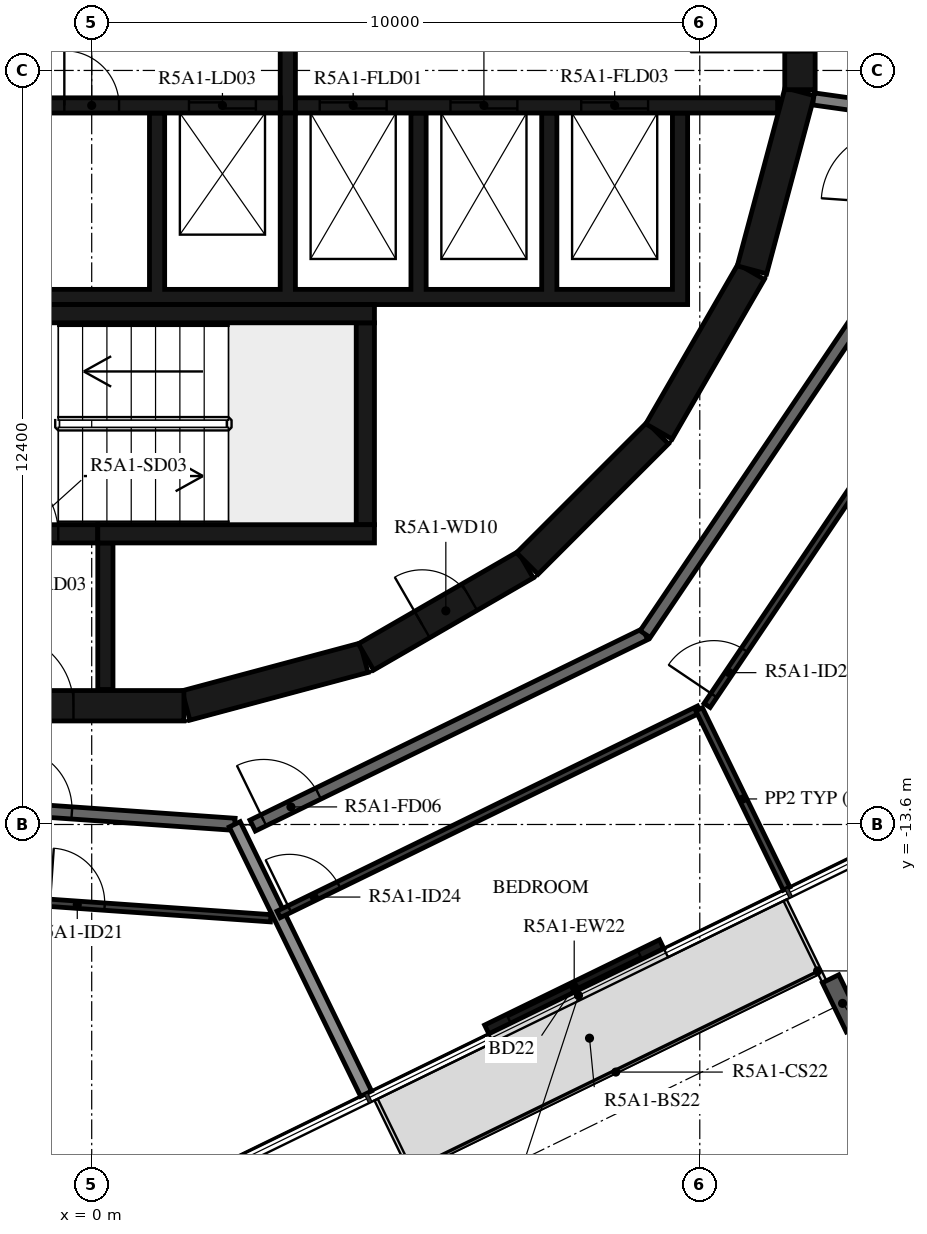
"""IFC4 building model, lengths in metres.
Left out: names, types, materials, properties, quantities, classifications, styles, units other than length and angle.
Written with IfcOpenShell. Run it as: python <this file> out.ifc"""

import sys

from ifc_helpers import new_model, si_unit, direction, frame, frame_2d, origin, origin_2d, place, context, subcontext, project, spatial, polyline, rectangle, i_section, outline, extrude, element, fill, save


model = new_model("IFC4")
c1 = context("Model", 3, precision=1e-05, world=origin(), true_north=direction((0.0, 1.0)))
c2 = subcontext(c1, "Body", "Model", "MODEL_VIEW")
j1 = project(units=[si_unit("LENGTHUNIT", "METRE"), si_unit("PLANEANGLEUNIT", "RADIAN")], contexts=[c1])
p1 = place(None, origin())
s1 = spatial("IfcSite", under=j1, at=p1, CompositionType="ELEMENT")
p2 = place(p1, origin())
s2 = spatial("IfcBuilding", under=s1, at=p2, CompositionType="ELEMENT")
p3 = place(p2, frame((0.0, 0.0, 191.9)))
s3 = spatial("IfcBuildingStorey", under=s2, at=p3, CompositionType="ELEMENT", Elevation=191.9)
p4 = place(p3, frame((12.348, -16.542, -0.38), z_axis=(0.0, 0.0, 1.0), x_axis=(-0.898794095235, -0.438371046456, 0.0)))
e1 = element("IfcColumn", 1, at=p4, inside=s3, PredefinedType="COLUMN", context=c2, shape_type="SweptSolid", body=[
    extrude(i_section(OverallWidth=0.3, OverallDepth=0.9, WebThickness=0.019, FlangeThickness=0.035, FilletRadius=0.03, at=origin_2d()), origin(), (0.0, 0.0, 1.0), 3.5),
])
p5 = place(p3, frame((6.497, -16.97, 0.0), z_axis=(0.0, 0.0, 1.0), x_axis=(0.898778711213, 0.43840258698, 0.0)))
e2 = element("IfcWall", 2, at=p5, inside=s3, PredefinedType="STANDARD", context=c2, shape_type="SweptSolid", body=[
    extrude(rectangle(XDim=3.2, YDim=0.16, at=frame_2d((1.6, 0.0))), origin(), (0.0, 0.0, 1.0), 3.12),
])
p6 = place(p5, frame((0.4, 0.0, 0.0)))
e3 = element("IfcOpeningElement", 3, at=p6, cuts=e2, PredefinedType="OPENING", context=c2, shape_type="SweptSolid", body=[
    extrude(rectangle(XDim=2.4, YDim=2.4, at=frame_2d((1.2, 1.2))), frame((0.0, 0.09, 0.0), z_axis=(0.0, -1.0, 0.0), x_axis=(1.0, 0.0, 0.0)), (0.0, 0.0, 1.0), 0.18),
])
p7 = place(p3, frame((1.55, -11.643, 0.0), z_axis=(0.0, 0.0, 1.0), x_axis=(0.965948410781, 0.258734743916, 0.0)))
e4 = element("IfcWall", 4, at=p7, inside=s3, PredefinedType="SHEAR", context=c2, shape_type="SweptSolid", body=[
    extrude(rectangle(XDim=3.033, YDim=0.5, at=frame_2d((1.516, 0.0))), origin(), (0.0, 0.0, 1.0), 3.12),
])
p8 = place(p3, frame((4.51, -10.845, 0.0), z_axis=(0.0, 0.0, 1.0), x_axis=(0.865975092491, 0.500087131594, 0.0)))
e5 = element("IfcWall", 5, at=p8, inside=s3, PredefinedType="SHEAR", context=c2, shape_type="SweptSolid", body=[
    extrude(rectangle(XDim=3.033, YDim=0.5, at=frame_2d((1.516, 0.0))), origin(), (0.0, 0.0, 1.0), 3.12),
])
p9 = place(p8, frame((1.066, 0.0, 0.0)))
e6 = element("IfcOpeningElement", 6, at=p9, cuts=e5, PredefinedType="OPENING", context=c2, shape_type="SweptSolid", body=[
    extrude(rectangle(XDim=0.9, YDim=2.1, at=frame_2d((0.45, 1.05))), frame((0.0, 0.26, 0.0), z_axis=(0.0, -1.0, 0.0), x_axis=(1.0, 0.0, 0.0)), (0.0, 0.0, 1.0), 0.52),
])
p10 = place(p3, frame((7.164, -9.308, 0.0), z_axis=(0.0, 0.0, 1.0), x_axis=(0.707106781187, 0.707106781187, 0.0)))
e7 = element("IfcWall", 7, at=p10, inside=s3, PredefinedType="SHEAR", context=c2, shape_type="SweptSolid", body=[
    extrude(rectangle(XDim=3.032, YDim=0.5, at=frame_2d((1.516, 0.0))), origin(), (0.0, 0.0, 1.0), 3.12),
])
for number, where, z_axis, x_axis in (
    (8, (9.329, -7.137, 0.0), (0.0, 0.0, 1.0), (0.5, 0.866, 0.0)),
    (9, (10.858, -4.479, 0.0), (0.0, 0.0, 1.0), (0.259, 0.966, 0.0)),
):
    element("IfcWall", number, at=place(p3, frame(where, z_axis=z_axis, x_axis=x_axis)), inside=s3, PredefinedType="SHEAR", context=c2, shape_type="SweptSolid", body=[
        extrude(rectangle(XDim=3.033, YDim=0.5, at=frame_2d((1.516, 0.0))), origin(), (0.0, 0.0, 1.0), 3.12),
    ])
p11 = place(p3, frame((11.647, -1.516, 0.0), z_axis=(0.0, 0.0, 1.0), x_axis=(0.0, 1.0, 0.0)))
e10 = element("IfcWall", 10, at=p11, inside=s3, PredefinedType="SHEAR", context=c2, shape_type="SweptSolid", body=[
    extrude(rectangle(XDim=3.033, YDim=0.5, at=frame_2d((1.516, 0.0))), origin(), (0.0, 0.0, 1.0), 3.12),
])
p12 = place(p11, frame((0.616, 0.0, 0.0)))
e11 = element("IfcOpeningElement", 11, at=p12, cuts=e10, PredefinedType="OPENING", context=c2, shape_type="SweptSolid", body=[
    extrude(rectangle(XDim=1.8, YDim=2.1, at=frame_2d((0.9, 1.05))), frame((0.0, 0.26, 0.0), z_axis=(0.0, -1.0, 0.0), x_axis=(1.0, 0.0, 0.0)), (0.0, 0.0, 1.0), 0.52),
])
p13 = place(p3, frame((-1.516, -11.647, 0.0), z_axis=(0.0, 0.0, 1.0), x_axis=(1.0, 0.0, 0.0)))
e12 = element("IfcWall", 12, at=p13, inside=s3, PredefinedType="SHEAR", context=c2, shape_type="SweptSolid", body=[
    extrude(rectangle(XDim=3.033, YDim=0.5, at=frame_2d((1.516, 0.0))), origin(), (0.0, 0.0, 1.0), 3.12),
])
p14 = place(p13, frame((0.016, 0.0, 0.0)))
e13 = element("IfcOpeningElement", 13, at=p14, cuts=e12, PredefinedType="OPENING", context=c2, shape_type="SweptSolid", body=[
    extrude(rectangle(XDim=1.2, YDim=2.1, at=frame_2d((0.6, 1.05))), frame((0.0, 0.26, 0.0), z_axis=(0.0, -1.0, 0.0), x_axis=(1.0, 0.0, 0.0)), (0.0, 0.0, 1.0), 0.52),
])
p15 = place(p3, frame((-2.4, -5.2, 0.0), z_axis=(0.0, 0.0, 1.0), x_axis=(1.0, 0.0, 0.0)))
e14 = element("IfcWall", 14, at=p15, inside=s3, PredefinedType="SHEAR", context=c2, shape_type="SweptSolid", body=[
    extrude(rectangle(XDim=7.05, YDim=0.3, at=frame_2d((3.525, 0.0))), origin(), (0.0, 0.0, 1.0), 3.12),
])
p16 = place(p3, frame((4.5, -8.67, 0.0), z_axis=(0.0, 0.0, 1.0), x_axis=(0.0, 1.0, 0.0)))
e15 = element("IfcWall", 15, at=p16, inside=s3, PredefinedType="SHEAR", context=c2, shape_type="SweptSolid", body=[
    extrude(rectangle(XDim=3.32, YDim=0.3, at=frame_2d((1.66, 0.0))), origin(), (0.0, 0.0, 1.0), 3.12),
])
p17 = place(p3, frame((0.1, -8.82, 0.0), z_axis=(0.0, 0.0, 1.0), x_axis=(1.0, 0.0, 0.0)))
e16 = element("IfcWall", 16, at=p17, inside=s3, PredefinedType="SHEAR", context=c2, shape_type="SweptSolid", body=[
    extrude(rectangle(XDim=4.55, YDim=0.3, at=frame_2d((2.275, 0.0))), origin(), (0.0, 0.0, 1.0), 3.12),
])
p18 = place(p3, frame((-2.4, -8.82, 0.0), z_axis=(0.0, 0.0, 1.0), x_axis=(1.0, 0.0, 0.0)))
e17 = element("IfcWall", 17, at=p18, inside=s3, PredefinedType="SHEAR", context=c2, shape_type="SweptSolid", body=[
    extrude(rectangle(XDim=2.5, YDim=0.3, at=frame_2d((1.25, 0.0))), origin(), (0.0, 0.0, 1.0), 3.12),
])
p19 = place(p18, frame((0.65, 0.0, 0.0)))
e18 = element("IfcOpeningElement", 18, at=p19, cuts=e17, PredefinedType="OPENING", context=c2, shape_type="SweptSolid", body=[
    extrude(rectangle(XDim=1.2, YDim=2.1, at=frame_2d((0.6, 1.05))), frame((0.0, 0.16, 0.0), z_axis=(0.0, -1.0, 0.0), x_axis=(1.0, 0.0, 0.0)), (0.0, 0.0, 1.0), 0.32),
])
p20 = place(p3, frame((0.225, -8.97, 0.0), z_axis=(0.0, 0.0, 1.0), x_axis=(0.0, -1.0, 0.0)))
e19 = element("IfcWall", 19, at=p20, inside=s3, PredefinedType="SHEAR", context=c2, shape_type="SweptSolid", body=[
    extrude(rectangle(XDim=2.41, YDim=0.25, at=frame_2d((1.205, 0.0))), origin(), (0.0, 0.0, 1.0), 3.12),
])
p21 = place(p3, origin())
e20 = element("IfcWall", 20, at=p21, inside=s3, PredefinedType="SHEAR", context=c2, shape_type="SweptSolid", body=[
    extrude(outline(polyline([(9.8, -5.05), (9.8, -4.8), (9.8, -1.9), (9.55, -1.9), (9.55, -4.8), (7.65, -4.8), (7.65, -1.9), (7.4, -1.9), (7.4, -4.8), (5.5, -4.8), (5.5, -1.9), (5.25, -1.9), (5.25, -4.8), (3.35, -4.8), (3.35, -1.9), (3.1, -1.9), (3.1, -4.8), (1.2, -4.8), (1.2, -1.9), (0.95, -1.9), (0.95, -4.8), (-0.95, -4.8), (-0.95, -1.9), (-1.2, -1.9), (-1.2, -4.8), (-3.1, -4.8), (-3.1, -1.9), (-3.35, -1.9), (-3.35, -4.8), (-5.25, -4.8), (-5.25, -1.9), (-5.5, -1.9), (-5.5, -4.8), (-7.4, -4.8), (-7.4, -1.9), (-7.65, -1.9), (-7.65, -4.8), (-9.55, -4.8), (-9.55, -1.9), (-9.8, -1.9), (-9.8, -4.8), (-9.8, -5.05), (9.8, -5.05)])), origin(), (0.0, 0.0, 1.0), 3.12),
])
p22 = place(p3, frame((-11.28, -1.775, 0.0), z_axis=(0.0, 0.0, 1.0), x_axis=(1.0, 0.0, 0.0)))
e21 = element("IfcWall", 21, at=p22, inside=s3, PredefinedType="SHEAR", context=c2, shape_type="SweptSolid", body=[
    extrude(rectangle(XDim=14.38, YDim=0.25, at=frame_2d((7.19, 0.0))), origin(), (0.0, 0.0, 1.0), 3.12),
])
p23 = place(p22, frame((12.88, 0.0, 0.0)))
e22 = element("IfcOpeningElement", 22, at=p23, cuts=e21, PredefinedType="OPENING", context=c2, shape_type="SweptSolid", body=[
    extrude(rectangle(XDim=1.1, YDim=2.1, at=frame_2d((0.55, 1.05))), frame((0.0, 0.135, 0.0), z_axis=(0.0, -1.0, 0.0), x_axis=(1.0, 0.0, 0.0)), (0.0, 0.0, 1.0), 0.27),
])
p24 = place(p22, frame((6.53, 0.0, 0.0)))
e23 = element("IfcOpeningElement", 23, at=p24, cuts=e21, PredefinedType="OPENING", context=c2, shape_type="SweptSolid", body=[
    extrude(rectangle(XDim=0.9, YDim=2.1, at=frame_2d((0.45, 1.05))), frame((0.0, 0.135, 0.0), z_axis=(0.0, -1.0, 0.0), x_axis=(1.0, 0.0, 0.0)), (0.0, 0.0, 1.0), 0.27),
])
p25 = place(p22, frame((8.68, 0.0, 0.0)))
e24 = element("IfcOpeningElement", 24, at=p25, cuts=e21, PredefinedType="OPENING", context=c2, shape_type="SweptSolid", body=[
    extrude(rectangle(XDim=0.9, YDim=2.1, at=frame_2d((0.45, 1.05))), frame((0.0, 0.135, 0.0), z_axis=(0.0, -1.0, 0.0), x_axis=(1.0, 0.0, 0.0)), (0.0, 0.0, 1.0), 0.27),
])
p26 = place(p22, frame((10.83, 0.0, 0.0)))
e25 = element("IfcOpeningElement", 25, at=p26, cuts=e21, PredefinedType="OPENING", context=c2, shape_type="SweptSolid", body=[
    extrude(rectangle(XDim=0.9, YDim=2.1, at=frame_2d((0.45, 1.05))), frame((0.0, 0.135, 0.0), z_axis=(0.0, -1.0, 0.0), x_axis=(1.0, 0.0, 0.0)), (0.0, 0.0, 1.0), 0.27),
])
p27 = place(p3, frame((3.35, -1.775, 0.0), z_axis=(0.0, 0.0, 1.0), x_axis=(1.0, 0.0, 0.0)))
e26 = element("IfcWall", 26, at=p27, inside=s3, PredefinedType="SHEAR", context=c2, shape_type="SweptSolid", body=[
    extrude(rectangle(XDim=7.93, YDim=0.25, at=frame_2d((3.965, 0.0))), origin(), (0.0, 0.0, 1.0), 3.12),
])
p28 = place(p27, frame((0.4, 0.0, 0.0)))
e27 = element("IfcOpeningElement", 27, at=p28, cuts=e26, PredefinedType="OPENING", context=c2, shape_type="SweptSolid", body=[
    extrude(rectangle(XDim=1.1, YDim=2.4, at=frame_2d((0.55, 1.2))), frame((0.0, 0.135, 0.0), z_axis=(0.0, -1.0, 0.0), x_axis=(1.0, 0.0, 0.0)), (0.0, 0.0, 1.0), 0.27),
])
p29 = place(p27, frame((2.55, 0.0, 0.0)))
e28 = element("IfcOpeningElement", 28, at=p29, cuts=e26, PredefinedType="OPENING", context=c2, shape_type="SweptSolid", body=[
    extrude(rectangle(XDim=1.1, YDim=2.4, at=frame_2d((0.55, 1.2))), frame((0.0, 0.135, 0.0), z_axis=(0.0, -1.0, 0.0), x_axis=(1.0, 0.0, 0.0)), (0.0, 0.0, 1.0), 0.27),
])
p30 = place(p27, frame((4.7, 0.0, 0.0)))
e29 = element("IfcOpeningElement", 29, at=p30, cuts=e26, PredefinedType="OPENING", context=c2, shape_type="SweptSolid", body=[
    extrude(rectangle(XDim=1.1, YDim=2.4, at=frame_2d((0.55, 1.2))), frame((0.0, 0.135, 0.0), z_axis=(0.0, -1.0, 0.0), x_axis=(1.0, 0.0, 0.0)), (0.0, 0.0, 1.0), 0.27),
])
p31 = place(p3, frame((3.225, -1.9, 0.0), z_axis=(0.0, 0.0, 1.0), x_axis=(0.0, 1.0, 0.0)))
e30 = element("IfcWall", 30, at=p31, inside=s3, PredefinedType="SHEAR", context=c2, shape_type="SweptSolid", body=[
    extrude(rectangle(XDim=3.8, YDim=0.25, at=frame_2d((1.9, 0.0))), origin(), (0.0, 0.0, 1.0), 3.12),
])
p32 = place(p3, frame((13.302, -1.869, 0.0), z_axis=(0.0, 0.0, 1.0), x_axis=(-0.990274397042, 0.13912806533, 0.0)))
e31 = element("IfcWall", 31, at=p32, inside=s3, PredefinedType="STANDARD", context=c2, shape_type="SweptSolid", body=[
    extrude(rectangle(XDim=1.446, YDim=0.2, at=frame_2d((0.723, 0.0))), origin(), (0.0, 0.0, 1.0), 3.12),
])
p33 = place(p3, frame((-4.517, -13.117, 0.0), z_axis=(0.0, 0.0, 1.0), x_axis=(0.997564669554, -0.069747616856, 0.0)))
e32 = element("IfcWall", 32, at=p33, inside=s3, PredefinedType="STANDARD", context=c2, shape_type="SweptSolid", body=[
    extrude(rectangle(XDim=6.885, YDim=0.2, at=frame_2d((3.443, 0.0))), origin(), (0.0, 0.0, 1.0), 3.12),
])
p34 = place(p33, frame((3.2, 0.0, 0.0)))
e33 = element("IfcOpeningElement", 33, at=p34, cuts=e32, PredefinedType="OPENING", context=c2, shape_type="SweptSolid", body=[
    extrude(rectangle(XDim=1.0, YDim=2.1, at=frame_2d((0.5, 1.05))), frame((0.0, 0.11, 0.0), z_axis=(0.0, -1.0, 0.0), x_axis=(1.0, 0.0, 0.0)), (0.0, 0.0, 1.0), 0.22),
])
p35 = place(p3, frame((2.647, -13.618, 0.0), z_axis=(0.0, 0.0, 1.0), x_axis=(0.898796543751, 0.438366026218, 0.0)))
e34 = element("IfcWall", 34, at=p35, inside=s3, PredefinedType="STANDARD", context=c2, shape_type="SweptSolid", body=[
    extrude(rectangle(XDim=7.181, YDim=0.2, at=frame_2d((3.591, 0.0))), origin(), (0.0, 0.0, 1.0), 3.12),
])
p36 = place(p35, frame((0.2, 0.0, 0.0)))
e35 = element("IfcOpeningElement", 35, at=p36, cuts=e34, PredefinedType="OPENING", context=c2, shape_type="SweptSolid", body=[
    extrude(rectangle(XDim=1.0, YDim=2.1, at=frame_2d((0.5, 1.05))), frame((0.0, 0.11, 0.0), z_axis=(0.0, -1.0, 0.0), x_axis=(1.0, 0.0, 0.0)), (0.0, 0.0, 1.0), 0.22),
])
p37 = place(p3, frame((9.101, -10.47, 0.0), z_axis=(0.0, 0.0, 1.0), x_axis=(0.559195469534, 0.829035841718, 0.0)))
e36 = element("IfcWall", 36, at=p37, inside=s3, PredefinedType="STANDARD", context=c2, shape_type="SweptSolid", body=[
    extrude(rectangle(XDim=7.181, YDim=0.2, at=frame_2d((3.591, 0.0))), origin(), (0.0, 0.0, 1.0), 3.12),
])
p38 = place(p3, frame((4.512, -18.027, 0.0), z_axis=(0.0, 0.0, 1.0), x_axis=(-0.438374835386, 0.898792247241, 0.0)))
e37 = element("IfcWall", 37, at=p38, inside=s3, PredefinedType="STANDARD", context=c2, shape_type="SweptSolid", body=[
    extrude(rectangle(XDim=4.929, YDim=0.2, at=frame_2d((2.464, 0.0))), origin(), (0.0, 0.0, 1.0), 2.73),
])
p39 = place(p3, frame((-5.022, -14.585, 0.0), z_axis=(0.0, 0.0, 1.0), x_axis=(0.997565118395, -0.069741197017, 0.0)))
e38 = element("IfcWall", 38, at=p39, inside=s3, PredefinedType="PARTITIONING", context=c2, shape_type="SweptSolid", body=[
    extrude(rectangle(XDim=7.985, YDim=0.12, at=frame_2d((3.993, 0.0))), origin(), (0.0, 0.0, 1.0), 3.12),
])
p40 = place(p39, frame((4.346, 0.0, 0.0)))
e39 = element("IfcOpeningElement", 39, at=p40, cuts=e38, PredefinedType="OPENING", context=c2, shape_type="SweptSolid", body=[
    extrude(rectangle(XDim=0.9, YDim=2.1, at=frame_2d((0.45, 1.05))), frame((0.0, 0.07, 0.0), z_axis=(0.0, -1.0, 0.0), x_axis=(1.0, 0.0, 0.0)), (0.0, 0.0, 1.0), 0.14),
])
p41 = place(p3, frame((3.074, -15.078, 0.0), z_axis=(0.0, 0.0, 1.0), x_axis=(0.898800770739, 0.438357359377, 0.0)))
e40 = element("IfcWall", 40, at=p41, inside=s3, PredefinedType="PARTITIONING", context=c2, shape_type="SweptSolid", body=[
    extrude(rectangle(XDim=7.694, YDim=0.12, at=frame_2d((3.847, 0.0))), origin(), (0.0, 0.0, 1.0), 3.12),
])
p42 = place(p41, frame((0.2, 0.0, 0.0)))
e41 = element("IfcOpeningElement", 41, at=p42, cuts=e40, PredefinedType="OPENING", context=c2, shape_type="SweptSolid", body=[
    extrude(rectangle(XDim=0.9, YDim=2.1, at=frame_2d((0.45, 1.05))), frame((0.0, 0.07, 0.0), z_axis=(0.0, -1.0, 0.0), x_axis=(1.0, 0.0, 0.0)), (0.0, 0.0, 1.0), 0.14),
])
p43 = place(p3, frame((10.12, -11.642, 0.0), z_axis=(0.0, 0.0, 1.0), x_axis=(0.559201404667, 0.829031838362, 0.0)))
e42 = element("IfcWall", 42, at=p43, inside=s3, PredefinedType="PARTITIONING", context=c2, shape_type="SweptSolid", body=[
    extrude(rectangle(XDim=7.709, YDim=0.12, at=frame_2d((3.854, 0.0))), origin(), (0.0, 0.0, 1.0), 3.12),
])
p44 = place(p43, frame((0.2, 0.0, 0.0)))
e43 = element("IfcOpeningElement", 43, at=p44, cuts=e42, PredefinedType="OPENING", context=c2, shape_type="SweptSolid", body=[
    extrude(rectangle(XDim=0.9, YDim=2.1, at=frame_2d((0.45, 1.05))), frame((0.0, 0.07, 0.0), z_axis=(0.0, -1.0, 0.0), x_axis=(1.0, 0.0, 0.0)), (0.0, 0.0, 1.0), 0.14),
])
p45 = place(p3, frame((11.427, -14.654, 0.0), z_axis=(0.0, 0.0, 1.0), x_axis=(-0.438410435857, 0.898774882677, 0.0)))
e44 = element("IfcWall", 44, at=p45, inside=s3, PredefinedType="PARTITIONING", context=c2, shape_type="SweptSolid", body=[
    extrude(rectangle(XDim=3.281, YDim=0.12, at=frame_2d((1.64, 0.0))), origin(), (0.0, 0.0, 1.0), 2.73),
])
p46 = place(p6, origin())
e45 = element("IfcDoor", 45, at=p46, inside=s3, OperationType="DOUBLE_DOOR_SLIDING", PredefinedType="DOOR", context=c2, shape_type="SweptSolid", body=[
    extrude(rectangle(XDim=2.4, YDim=2.4, at=frame_2d((1.2, 1.2))), frame((0.0, 0.025, 0.0), z_axis=(0.0, -1.0, 0.0), x_axis=(1.0, 0.0, 0.0)), (0.0, 0.0, 1.0), 0.05),
])
fill(e3, e45)
p47 = place(p19, origin())
e46 = element("IfcDoor", 46, at=p47, inside=s3, OperationType="SINGLE_SWING_LEFT", PredefinedType="DOOR", context=c2, shape_type="SweptSolid", body=[
    extrude(rectangle(XDim=1.2, YDim=2.1, at=frame_2d((0.6, 1.05))), frame((0.0, 0.025, 0.0), z_axis=(0.0, -1.0, 0.0), x_axis=(1.0, 0.0, 0.0)), (0.0, 0.0, 1.0), 0.05),
])
fill(e18, e46)
p48 = place(p14, origin())
e47 = element("IfcDoor", 47, at=p48, inside=s3, OperationType="SINGLE_SWING_RIGHT", PredefinedType="DOOR", context=c2, shape_type="SweptSolid", body=[
    extrude(rectangle(XDim=1.2, YDim=2.1, at=frame_2d((0.6, 1.05))), frame((0.0, 0.025, 0.0), z_axis=(0.0, -1.0, 0.0), x_axis=(1.0, 0.0, 0.0)), (0.0, 0.0, 1.0), 0.05),
])
fill(e13, e47)
p49 = place(p12, origin())
e48 = element("IfcDoor", 48, at=p49, inside=s3, OperationType="DOUBLE_DOOR_SINGLE_SWING", PredefinedType="DOOR", context=c2, shape_type="SweptSolid", body=[
    extrude(rectangle(XDim=1.8, YDim=2.1, at=frame_2d((0.9, 1.05))), frame((0.0, 0.025, 0.0), z_axis=(0.0, -1.0, 0.0), x_axis=(1.0, 0.0, 0.0)), (0.0, 0.0, 1.0), 0.05),
])
fill(e11, e48)
p50 = place(p23, origin())
e49 = element("IfcDoor", 49, at=p50, inside=s3, OperationType="DOUBLE_DOOR_SLIDING", PredefinedType="DOOR", context=c2, shape_type="SweptSolid", body=[
    extrude(rectangle(XDim=1.1, YDim=2.1, at=frame_2d((0.55, 1.05))), frame((0.0, 0.025, 0.0), z_axis=(0.0, -1.0, 0.0), x_axis=(1.0, 0.0, 0.0)), (0.0, 0.0, 1.0), 0.05),
])
fill(e22, e49)
p51 = place(p28, origin())
e50 = element("IfcDoor", 50, at=p51, inside=s3, OperationType="DOUBLE_DOOR_SLIDING", PredefinedType="DOOR", context=c2, shape_type="SweptSolid", body=[
    extrude(rectangle(XDim=1.1, YDim=2.4, at=frame_2d((0.55, 1.2))), frame((0.0, 0.025, 0.0), z_axis=(0.0, -1.0, 0.0), x_axis=(1.0, 0.0, 0.0)), (0.0, 0.0, 1.0), 0.05),
])
fill(e27, e50)
p52 = place(p29, origin())
e51 = element("IfcDoor", 51, at=p52, inside=s3, OperationType="DOUBLE_DOOR_SLIDING", PredefinedType="DOOR", context=c2, shape_type="SweptSolid", body=[
    extrude(rectangle(XDim=1.1, YDim=2.4, at=frame_2d((0.55, 1.2))), frame((0.0, 0.025, 0.0), z_axis=(0.0, -1.0, 0.0), x_axis=(1.0, 0.0, 0.0)), (0.0, 0.0, 1.0), 0.05),
])
fill(e28, e51)
p53 = place(p30, origin())
e52 = element("IfcDoor", 52, at=p53, inside=s3, OperationType="DOUBLE_DOOR_SLIDING", PredefinedType="DOOR", context=c2, shape_type="SweptSolid", body=[
    extrude(rectangle(XDim=1.1, YDim=2.4, at=frame_2d((0.55, 1.2))), frame((0.0, 0.025, 0.0), z_axis=(0.0, -1.0, 0.0), x_axis=(1.0, 0.0, 0.0)), (0.0, 0.0, 1.0), 0.05),
])
fill(e29, e52)
p54 = place(p26, origin())
e53 = element("IfcDoor", 53, at=p54, inside=s3, OperationType="SINGLE_SWING_RIGHT", PredefinedType="DOOR", context=c2, shape_type="SweptSolid", body=[
    extrude(rectangle(XDim=0.9, YDim=2.1, at=frame_2d((0.45, 1.05))), frame((0.0, 0.025, 0.0), z_axis=(0.0, -1.0, 0.0), x_axis=(1.0, 0.0, 0.0)), (0.0, 0.0, 1.0), 0.05),
])
fill(e25, e53)
p55 = place(p9, origin())
e54 = element("IfcDoor", 54, at=p55, inside=s3, OperationType="SINGLE_SWING_RIGHT", PredefinedType="DOOR", context=c2, shape_type="SweptSolid", body=[
    extrude(rectangle(XDim=0.9, YDim=2.1, at=frame_2d((0.45, 1.05))), frame((0.0, 0.025, 0.0), z_axis=(0.0, -1.0, 0.0), x_axis=(1.0, 0.0, 0.0)), (0.0, 0.0, 1.0), 0.05),
])
fill(e6, e54)
p56 = place(p34, origin())
e55 = element("IfcDoor", 55, at=p56, inside=s3, OperationType="SINGLE_SWING_LEFT", PredefinedType="DOOR", context=c2, shape_type="SweptSolid", body=[
    extrude(rectangle(XDim=1.0, YDim=2.1, at=frame_2d((0.5, 1.05))), frame((0.0, 0.025, 0.0), z_axis=(0.0, -1.0, 0.0), x_axis=(1.0, 0.0, 0.0)), (0.0, 0.0, 1.0), 0.05),
])
fill(e33, e55)
p57 = place(p40, origin())
e56 = element("IfcDoor", 56, at=p57, inside=s3, OperationType="SINGLE_SWING_LEFT", PredefinedType="DOOR", context=c2, shape_type="SweptSolid", body=[
    extrude(rectangle(XDim=0.9, YDim=2.1, at=frame_2d((0.45, 1.05))), frame((0.0, 0.025, 0.0), z_axis=(0.0, -1.0, 0.0), x_axis=(1.0, 0.0, 0.0)), (0.0, 0.0, 1.0), 0.05),
])
fill(e39, e56)
p58 = place(p36, origin())
e57 = element("IfcDoor", 57, at=p58, inside=s3, OperationType="SINGLE_SWING_LEFT", PredefinedType="DOOR", context=c2, shape_type="SweptSolid", body=[
    extrude(rectangle(XDim=1.0, YDim=2.1, at=frame_2d((0.5, 1.05))), frame((0.0, 0.025, 0.0), z_axis=(0.0, -1.0, 0.0), x_axis=(1.0, 0.0, 0.0)), (0.0, 0.0, 1.0), 0.05),
])
fill(e35, e57)
p59 = place(p42, origin())
e58 = element("IfcDoor", 58, at=p59, inside=s3, OperationType="SINGLE_SWING_LEFT", PredefinedType="DOOR", context=c2, shape_type="SweptSolid", body=[
    extrude(rectangle(XDim=0.9, YDim=2.1, at=frame_2d((0.45, 1.05))), frame((0.0, 0.025, 0.0), z_axis=(0.0, -1.0, 0.0), x_axis=(1.0, 0.0, 0.0)), (0.0, 0.0, 1.0), 0.05),
])
fill(e41, e58)
p60 = place(p44, origin())
e59 = element("IfcDoor", 59, at=p60, inside=s3, OperationType="SINGLE_SWING_RIGHT", PredefinedType="DOOR", context=c2, shape_type="SweptSolid", body=[
    extrude(rectangle(XDim=0.9, YDim=2.1, at=frame_2d((0.45, 1.05))), frame((0.0, 0.025, 0.0), z_axis=(0.0, -1.0, 0.0), x_axis=(1.0, 0.0, 0.0)), (0.0, 0.0, 1.0), 0.05),
])
fill(e43, e59)
save(model, sys.argv[1])
